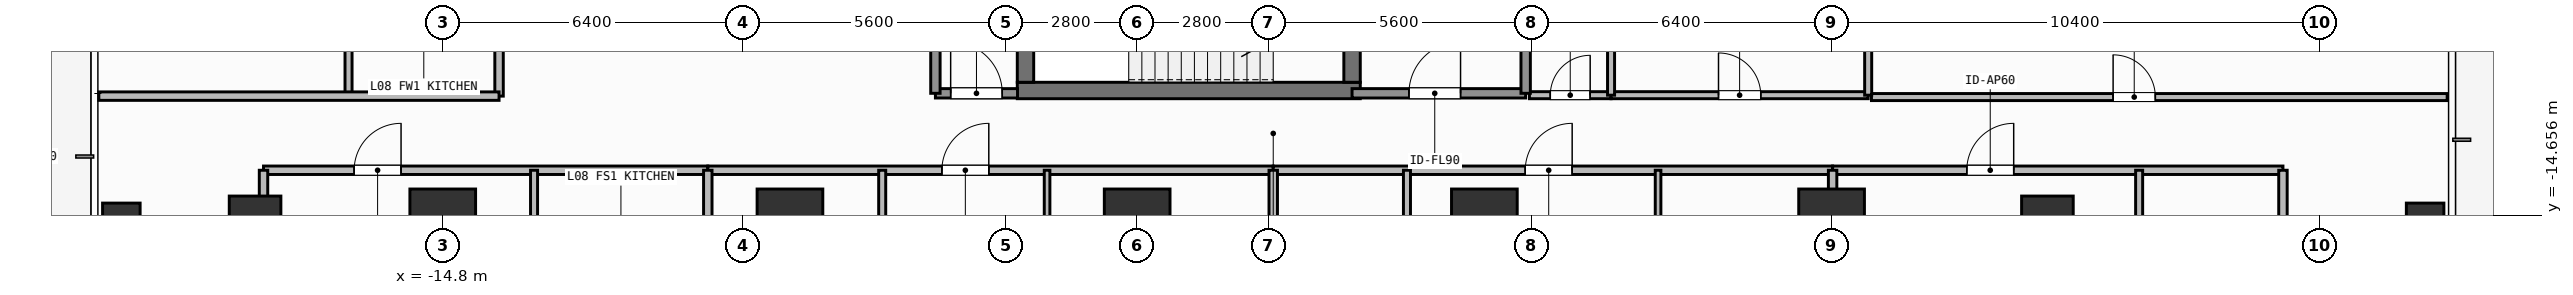
"""IFC4 building model, lengths in metres.
Left out: names, types, materials, properties, quantities, classifications, styles, units other than length and angle.
Written with IfcOpenShell. Run it as: python <this file> out.ifc"""

import sys

from ifc_helpers import new_model, si_unit, direction, frame, frame_2d, origin, origin_2d, place, context, subcontext, project, spatial, rectangle, hollow_rectangle, extrude, element, fill, save


model = new_model("IFC4")
c1 = context("Model", 3, precision=1e-05, world=origin(), true_north=direction((0.0, 1.0)))
c2 = subcontext(c1, "Body", "Model", "MODEL_VIEW")
j1 = project(units=[si_unit("LENGTHUNIT", "METRE"), si_unit("PLANEANGLEUNIT", "RADIAN")], contexts=[c1])
p1 = place(None, origin())
s1 = spatial("IfcSite", under=j1, at=p1, CompositionType="ELEMENT")
p2 = place(p1, origin())
s2 = spatial("IfcBuilding", under=s1, at=p2, CompositionType="ELEMENT")
p3 = place(p2, frame((0.0, 0.0, 30.6)))
s3 = spatial("IfcBuildingStorey", under=s2, at=p3, CompositionType="ELEMENT", Elevation=30.6)
p4 = place(p3, frame((-2.555, -12.0, 0.0), z_axis=(0.0, 0.0, 1.0), x_axis=(1.0, 0.0, 0.0)))
e1 = element("IfcWall", 1, at=p4, inside=s3, PredefinedType="SHEAR", context=c2, shape_type="SweptSolid", body=[
    extrude(rectangle(XDim=7.31, YDim=0.35, at=frame_2d((3.655, 0.0))), origin(), (0.0, 0.0, 1.0), 3.9),
])
p5 = place(p3, frame((-2.38, -11.825, 0.0), z_axis=(0.0, 0.0, 1.0), x_axis=(0.0, 1.0, 0.0)))
e2 = element("IfcWall", 2, at=p5, inside=s3, PredefinedType="SHEAR", context=c2, shape_type="SweptSolid", body=[
    extrude(rectangle(XDim=2.925, YDim=0.35, at=frame_2d((1.462, 0.0))), origin(), (0.0, 0.0, 1.0), 3.9),
])
p6 = place(p3, frame((4.58, -8.9, 0.0), z_axis=(0.0, 0.0, 1.0), x_axis=(0.0, -1.0, 0.0)))
e3 = element("IfcWall", 3, at=p6, inside=s3, PredefinedType="SHEAR", context=c2, shape_type="SweptSolid", body=[
    extrude(rectangle(XDim=2.925, YDim=0.35, at=frame_2d((1.462, 0.0))), origin(), (0.0, 0.0, 1.0), 3.9),
])
p7 = place(p6, frame((0.913, 0.0, 0.0)))
e4 = element("IfcOpeningElement", 4, at=p7, cuts=e3, PredefinedType="OPENING", context=c2, shape_type="SweptSolid", body=[
    extrude(rectangle(XDim=1.1, YDim=2.15, at=frame_2d((0.55, 1.075))), frame((0.0, 0.185, 0.0), z_axis=(0.0, -1.0, 0.0), x_axis=(1.0, 0.0, 0.0)), (0.0, 0.0, 1.0), 0.37),
])
for number, where, z_axis, x_axis in (
    (5, (-14.8, -14.8, 0.0), (0.0, 0.0, 1.0), (1.0, 0.0, 0.0)),
    (6, (-7.4, -14.8, 0.0), (0.0, 0.0, 1.0), (1.0, 0.0, 0.0)),
    (7, (0.0, -14.8, 0.0), (0.0, 0.0, 1.0), (1.0, 0.0, 0.0)),
    (8, (7.4, -14.8, 0.0), (0.0, 0.0, 1.0), (1.0, 0.0, 0.0)),
    (9, (14.8, -14.8, 0.0), (0.0, 0.0, 1.0), (1.0, 0.0, 0.0)),
):
    element("IfcColumn", number, at=place(p3, frame(where, z_axis=z_axis, x_axis=x_axis)), inside=s3, PredefinedType="COLUMN", context=c2, shape_type="SweptSolid", body=[
        extrude(rectangle(XDim=1.4, YDim=1.4, at=origin_2d()), origin(), (0.0, 0.0, 1.0), 3.9),
    ])
for number, where, z_axis, x_axis in (
    (10, (-18.8, -14.8, 0.0), (0.0, 0.0, 1.0), (1.0, 0.0, 0.0)),
    (11, (19.4, -14.8, 0.0), (0.0, 0.0, 1.0), (1.0, 0.0, 0.0)),
):
    element("IfcColumn", number, at=place(p3, frame(where, z_axis=z_axis, x_axis=x_axis)), inside=s3, PredefinedType="COLUMN", context=c2, shape_type="SweptSolid", body=[
        extrude(rectangle(XDim=1.1, YDim=1.1, at=origin_2d()), origin(), (0.0, 0.0, 1.0), 3.9),
    ])
for number, where, z_axis, x_axis in (
    (12, (-21.65, -14.8, 0.0), (0.0, 0.0, 1.0), (1.0, 0.0, 0.0)),
    (13, (27.45, -14.8, 0.0), (0.0, 0.0, 1.0), (1.0, 0.0, 0.0)),
):
    element("IfcColumn", number, at=place(p3, frame(where, z_axis=z_axis, x_axis=x_axis)), inside=s3, PredefinedType="COLUMN", context=c2, shape_type="SweptSolid", body=[
        extrude(hollow_rectangle(XDim=0.8, YDim=0.8, WallThickness=0.036, at=origin_2d()), origin(), (0.0, 0.0, 1.0), 3.9),
    ])
p8 = place(p3, frame((4.58, -12.06, 0.0), z_axis=(0.0, 0.0, 1.0), x_axis=(1.0, 0.0, 0.0)))
e14 = element("IfcWall", 14, at=p8, inside=s3, PredefinedType="SOLIDWALL", context=c2, shape_type="SweptSolid", body=[
    extrude(rectangle(XDim=3.7, YDim=0.2, at=frame_2d((1.85, 0.0))), origin(), (0.0, 0.0, 1.0), 3.68),
])
p9 = place(p8, frame((1.212, 0.0, 0.0)))
e15 = element("IfcOpeningElement", 15, at=p9, cuts=e14, PredefinedType="OPENING", context=c2, shape_type="SweptSolid", body=[
    extrude(rectangle(XDim=1.1, YDim=2.15, at=frame_2d((0.55, 1.075))), frame((0.0, 0.11, 0.0), z_axis=(0.0, -1.0, 0.0), x_axis=(1.0, 0.0, 0.0)), (0.0, 0.0, 1.0), 0.22),
])
p10 = place(p3, frame((-4.3, -12.06, 0.0), z_axis=(0.0, 0.0, 1.0), x_axis=(1.0, 0.0, 0.0)))
e16 = element("IfcWall", 16, at=p10, inside=s3, PredefinedType="SOLIDWALL", context=c2, shape_type="SweptSolid", body=[
    extrude(rectangle(XDim=1.75, YDim=0.2, at=frame_2d((0.875, 0.0))), origin(), (0.0, 0.0, 1.0), 3.68),
])
p11 = place(p10, frame((0.325, 0.0, 0.0)))
e17 = element("IfcOpeningElement", 17, at=p11, cuts=e16, PredefinedType="OPENING", context=c2, shape_type="SweptSolid", body=[
    extrude(rectangle(XDim=1.1, YDim=2.15, at=frame_2d((0.55, 1.075))), frame((0.0, 0.11, 0.0), z_axis=(0.0, -1.0, 0.0), x_axis=(1.0, 0.0, 0.0)), (0.0, 0.0, 1.0), 0.22),
])
p12 = place(p3, frame((8.36, -12.1, 0.0), z_axis=(0.0, 0.0, 1.0), x_axis=(1.0, 0.0, 0.0)))
e18 = element("IfcWall", 18, at=p12, inside=s3, PredefinedType="PARTITIONING", context=c2, shape_type="SweptSolid", body=[
    extrude(rectangle(XDim=1.74, YDim=0.15, at=frame_2d((0.87, 0.0))), origin(), (0.0, 0.0, 1.0), 3.68),
])
p13 = place(p12, frame((0.445, 0.0, 0.0)))
e19 = element("IfcOpeningElement", 19, at=p13, cuts=e18, PredefinedType="OPENING", context=c2, shape_type="SweptSolid", body=[
    extrude(rectangle(XDim=0.85, YDim=2.1, at=frame_2d((0.425, 1.05))), frame((0.0, 0.085, 0.0), z_axis=(0.0, -1.0, 0.0), x_axis=(1.0, 0.0, 0.0)), (0.0, 0.0, 1.0), 0.17),
])
p14 = place(p3, frame((10.1, -12.1, 0.0), z_axis=(0.0, 0.0, 1.0), x_axis=(1.0, 0.0, 0.0)))
e20 = element("IfcWall", 20, at=p14, inside=s3, PredefinedType="PARTITIONING", context=c2, shape_type="SweptSolid", body=[
    extrude(rectangle(XDim=5.48, YDim=0.15, at=frame_2d((2.74, 0.0))), origin(), (0.0, 0.0, 1.0), 3.68),
])
p15 = place(p14, frame((2.29, 0.0, 0.0)))
e21 = element("IfcOpeningElement", 21, at=p15, cuts=e20, PredefinedType="OPENING", context=c2, shape_type="SweptSolid", body=[
    extrude(rectangle(XDim=0.9, YDim=2.1, at=frame_2d((0.45, 1.05))), frame((0.0, 0.085, 0.0), z_axis=(0.0, -1.0, 0.0), x_axis=(1.0, 0.0, 0.0)), (0.0, 0.0, 1.0), 0.17),
])
p16 = place(p3, frame((-18.62, -13.7, 0.0), z_axis=(0.0, 0.0, 1.0), x_axis=(1.0, 0.0, 0.0)))
e22 = element("IfcWall", 22, at=p16, inside=s3, PredefinedType="PARTITIONING", context=c2, shape_type="SweptSolid", body=[
    extrude(rectangle(XDim=9.469, YDim=0.18, at=frame_2d((4.735, 0.0))), origin(), (0.0, 0.0, 1.0), 3.68),
])
p17 = place(p16, frame((1.931, 0.0, 0.0)))
e23 = element("IfcOpeningElement", 23, at=p17, cuts=e22, PredefinedType="OPENING", context=c2, shape_type="SweptSolid", body=[
    extrude(rectangle(XDim=1.0, YDim=2.2, at=frame_2d((0.5, 1.1))), frame((0.0, 0.1, 0.0), z_axis=(0.0, -1.0, 0.0), x_axis=(1.0, 0.0, 0.0)), (0.0, 0.0, 1.0), 0.2),
])
p18 = place(p3, frame((-12.854, -17.599, 0.0), z_axis=(0.0, 0.0, 1.0), x_axis=(0.0, 1.0, 0.0)))
e24 = element("IfcWall", 24, at=p18, inside=s3, PredefinedType="PARTITIONING", context=c2, shape_type="SweptSolid", body=[
    extrude(rectangle(XDim=3.899, YDim=0.15, at=frame_2d((1.95, 0.0))), origin(), (0.0, 0.0, 1.0), 3.68),
])
p19 = place(p18, frame((1.183, 0.0, 0.0)))
e25 = element("IfcOpeningElement", 25, at=p19, cuts=e24, PredefinedType="OPENING", context=c2, shape_type="SweptSolid", body=[
    extrude(rectangle(XDim=0.85, YDim=2.1, at=frame_2d((0.425, 1.05))), frame((0.0, 0.085, 0.0), z_axis=(0.0, -1.0, 0.0), x_axis=(1.0, 0.0, 0.0)), (0.0, 0.0, 1.0), 0.17),
])
p20 = place(p3, frame((-9.151, -13.7, 0.0), z_axis=(0.0, 0.0, 1.0), x_axis=(1.0, 0.0, 0.0)))
e26 = element("IfcWall", 26, at=p20, inside=s3, PredefinedType="PARTITIONING", context=c2, shape_type="SweptSolid", body=[
    extrude(rectangle(XDim=12.051, YDim=0.18, at=frame_2d((6.025, 0.0))), origin(), (0.0, 0.0, 1.0), 3.68),
])
p21 = place(p20, frame((4.989, 0.0, 0.0)))
e27 = element("IfcOpeningElement", 27, at=p21, cuts=e26, PredefinedType="OPENING", context=c2, shape_type="SweptSolid", body=[
    extrude(rectangle(XDim=1.0, YDim=2.2, at=frame_2d((0.5, 1.1))), frame((0.0, 0.1, 0.0), z_axis=(0.0, -1.0, 0.0), x_axis=(1.0, 0.0, 0.0)), (0.0, 0.0, 1.0), 0.2),
])
p22 = place(p3, frame((-5.434, -20.79, 0.0), z_axis=(0.0, 0.0, 1.0), x_axis=(0.0, 1.0, 0.0)))
e28 = element("IfcWall", 28, at=p22, inside=s3, PredefinedType="PARTITIONING", context=c2, shape_type="SweptSolid", body=[
    extrude(rectangle(XDim=7.09, YDim=0.15, at=frame_2d((3.545, 0.0))), origin(), (0.0, 0.0, 1.0), 3.68),
])
p23 = place(p22, frame((2.133, 0.0, 0.0)))
e29 = element("IfcOpeningElement", 29, at=p23, cuts=e28, PredefinedType="OPENING", context=c2, shape_type="SweptSolid", body=[
    extrude(rectangle(XDim=0.85, YDim=2.1, at=frame_2d((0.425, 1.05))), frame((0.0, 0.085, 0.0), z_axis=(0.0, -1.0, 0.0), x_axis=(1.0, 0.0, 0.0)), (0.0, 0.0, 1.0), 0.17),
])
p24 = place(p3, frame((-1.92, -18.663, 0.0), z_axis=(0.0, 0.0, 1.0), x_axis=(0.0, 1.0, 0.0)))
e30 = element("IfcWall", 30, at=p24, inside=s3, PredefinedType="PARTITIONING", context=c2, shape_type="SweptSolid", body=[
    extrude(rectangle(XDim=4.963, YDim=0.12, at=frame_2d((2.481, 0.0))), origin(), (0.0, 0.0, 1.0), 3.68),
])
p25 = place(p24, frame((2.056, 0.0, 0.0)))
e31 = element("IfcOpeningElement", 31, at=p25, cuts=e30, PredefinedType="OPENING", context=c2, shape_type="SweptSolid", body=[
    extrude(rectangle(XDim=0.85, YDim=2.1, at=frame_2d((0.425, 1.05))), frame((0.0, 0.07, 0.0), z_axis=(0.0, -1.0, 0.0), x_axis=(1.0, 0.0, 0.0)), (0.0, 0.0, 1.0), 0.14),
])
p26 = place(p3, frame((2.9, -13.7, 0.0), z_axis=(0.0, 0.0, 1.0), x_axis=(1.0, 0.0, 0.0)))
e32 = element("IfcWall", 32, at=p26, inside=s3, PredefinedType="PARTITIONING", context=c2, shape_type="SweptSolid", body=[
    extrude(rectangle(XDim=11.922, YDim=0.18, at=frame_2d((5.961, 0.0))), origin(), (0.0, 0.0, 1.0), 3.68),
])
p27 = place(p26, frame((5.371, 0.0, 0.0)))
e33 = element("IfcOpeningElement", 33, at=p27, cuts=e32, PredefinedType="OPENING", context=c2, shape_type="SweptSolid", body=[
    extrude(rectangle(XDim=1.0, YDim=2.2, at=frame_2d((0.5, 1.1))), frame((0.0, 0.1, 0.0), z_axis=(0.0, -1.0, 0.0), x_axis=(1.0, 0.0, 0.0)), (0.0, 0.0, 1.0), 0.2),
])
p28 = place(p3, frame((5.75, -20.79, 0.0), z_axis=(0.0, 0.0, 1.0), x_axis=(0.0, 1.0, 0.0)))
e34 = element("IfcWall", 34, at=p28, inside=s3, PredefinedType="PARTITIONING", context=c2, shape_type="SweptSolid", body=[
    extrude(rectangle(XDim=7.09, YDim=0.15, at=frame_2d((3.545, 0.0))), origin(), (0.0, 0.0, 1.0), 3.68),
])
p29 = place(p28, frame((2.133, 0.0, 0.0)))
e35 = element("IfcOpeningElement", 35, at=p29, cuts=e34, PredefinedType="OPENING", context=c2, shape_type="SweptSolid", body=[
    extrude(rectangle(XDim=0.85, YDim=2.1, at=frame_2d((0.425, 1.05))), frame((0.0, 0.085, 0.0), z_axis=(0.0, -1.0, 0.0), x_axis=(1.0, 0.0, 0.0)), (0.0, 0.0, 1.0), 0.17),
])
p30 = place(p3, frame((11.102, -18.535, 0.0), z_axis=(0.0, 0.0, 1.0), x_axis=(0.0, 1.0, 0.0)))
e36 = element("IfcWall", 36, at=p30, inside=s3, PredefinedType="PARTITIONING", context=c2, shape_type="SweptSolid", body=[
    extrude(rectangle(XDim=4.835, YDim=0.12, at=frame_2d((2.417, 0.0))), origin(), (0.0, 0.0, 1.0), 3.37),
])
p31 = place(p30, frame((1.905, 0.0, 0.0)))
e37 = element("IfcOpeningElement", 37, at=p31, cuts=e36, PredefinedType="OPENING", context=c2, shape_type="SweptSolid", body=[
    extrude(rectangle(XDim=0.85, YDim=2.1, at=frame_2d((0.425, 1.05))), frame((0.0, 0.07, 0.0), z_axis=(0.0, -1.0, 0.0), x_axis=(1.0, 0.0, 0.0)), (0.0, 0.0, 1.0), 0.14),
])
p32 = place(p3, frame((14.822, -13.7, 0.0), z_axis=(0.0, 0.0, 1.0), x_axis=(1.0, 0.0, 0.0)))
e38 = element("IfcWall", 38, at=p32, inside=s3, PredefinedType="PARTITIONING", context=c2, shape_type="SweptSolid", body=[
    extrude(rectangle(XDim=9.598, YDim=0.18, at=frame_2d((4.799, 0.0))), origin(), (0.0, 0.0, 1.0), 3.68),
])
p33 = place(p32, frame((2.859, 0.0, 0.0)))
e39 = element("IfcOpeningElement", 39, at=p33, cuts=e38, PredefinedType="OPENING", context=c2, shape_type="SweptSolid", body=[
    extrude(rectangle(XDim=1.0, YDim=2.2, at=frame_2d((0.5, 1.1))), frame((0.0, 0.1, 0.0), z_axis=(0.0, -1.0, 0.0), x_axis=(1.0, 0.0, 0.0)), (0.0, 0.0, 1.0), 0.2),
])
p34 = place(p3, frame((21.355, -17.599, 0.0), z_axis=(0.0, 0.0, 1.0), x_axis=(0.0, 1.0, 0.0)))
e40 = element("IfcWall", 40, at=p34, inside=s3, PredefinedType="PARTITIONING", context=c2, shape_type="SweptSolid", body=[
    extrude(rectangle(XDim=3.899, YDim=0.15, at=frame_2d((1.95, 0.0))), origin(), (0.0, 0.0, 1.0), 3.68),
])
p35 = place(p34, frame((1.354, 0.0, 0.0)))
e41 = element("IfcOpeningElement", 41, at=p35, cuts=e40, PredefinedType="OPENING", context=c2, shape_type="SweptSolid", body=[
    extrude(rectangle(XDim=0.85, YDim=2.1, at=frame_2d((0.425, 1.05))), frame((0.0, 0.085, 0.0), z_axis=(0.0, -1.0, 0.0), x_axis=(1.0, 0.0, 0.0)), (0.0, 0.0, 1.0), 0.17),
])
p36 = place(p3, frame((-13.6, -12.12, 0.0), z_axis=(0.0, 0.0, 1.0), x_axis=(0.0, 1.0, 0.0)))
e42 = element("IfcWall", 42, at=p36, inside=s3, PredefinedType="PARTITIONING", context=c2, shape_type="SweptSolid", body=[
    extrude(rectangle(XDim=12.847, YDim=0.18, at=frame_2d((6.424, 0.0))), origin(), (0.0, 0.0, 1.0), 3.68),
])
p37 = place(p36, frame((5.48, 0.0, 0.0)))
e43 = element("IfcOpeningElement", 43, at=p37, cuts=e42, PredefinedType="OPENING", context=c2, shape_type="SweptSolid", body=[
    extrude(rectangle(XDim=1.0, YDim=2.2, at=frame_2d((0.5, 1.1))), frame((0.0, 0.1, 0.0), z_axis=(0.0, -1.0, 0.0), x_axis=(1.0, 0.0, 0.0)), (0.0, 0.0, 1.0), 0.2),
])
p38 = place(p3, frame((15.65, -12.14, 0.0), z_axis=(0.0, 0.0, 1.0), x_axis=(1.0, 0.0, 0.0)))
e44 = element("IfcWall", 44, at=p38, inside=s3, PredefinedType="PARTITIONING", context=c2, shape_type="SweptSolid", body=[
    extrude(rectangle(XDim=12.27, YDim=0.15, at=frame_2d((6.135, 0.0))), origin(), (0.0, 0.0, 1.0), 3.68),
])
p39 = place(p38, frame((5.15, 0.0, 0.0)))
e45 = element("IfcOpeningElement", 45, at=p39, cuts=e44, PredefinedType="OPENING", context=c2, shape_type="SweptSolid", body=[
    extrude(rectangle(XDim=0.9, YDim=2.1, at=frame_2d((0.45, 1.05))), frame((0.0, 0.085, 0.0), z_axis=(0.0, -1.0, 0.0), x_axis=(1.0, 0.0, 0.0)), (0.0, 0.0, 1.0), 0.17),
])
for number, where, z_axis, x_axis in (
    (46, (8.28, -12.06, 0.0), (0.0, 0.0, 1.0), (0.0, 1.0, 0.0)),
    (47, (-4.3, -12.06, 0.0), (0.0, 0.0, 1.0), (0.0, 1.0, 0.0)),
):
    element("IfcWall", number, at=place(p3, frame(where, z_axis=z_axis, x_axis=x_axis)), inside=s3, PredefinedType="SOLIDWALL", context=c2, shape_type="SweptSolid", body=[
        extrude(rectangle(XDim=3.11, YDim=0.2, at=frame_2d((1.555, 0.0))), origin(), (0.0, 0.0, 1.0), 3.68),
    ])
p40 = place(p3, frame((10.1, -12.1, 0.0), z_axis=(0.0, 0.0, 1.0), x_axis=(0.0, 1.0, 0.0)))
e48 = element("IfcWall", 48, at=p40, inside=s3, PredefinedType="PARTITIONING", context=c2, shape_type="SweptSolid", body=[
    extrude(rectangle(XDim=2.35, YDim=0.15, at=frame_2d((1.175, 0.0))), origin(), (0.0, 0.0, 1.0), 3.68),
])
p41 = place(p3, frame((15.58, -12.1, 0.0), z_axis=(0.0, 0.0, 1.0), x_axis=(0.0, 1.0, 0.0)))
e49 = element("IfcWall", 49, at=p41, inside=s3, PredefinedType="PARTITIONING", context=c2, shape_type="SweptSolid", body=[
    extrude(rectangle(XDim=6.25, YDim=0.15, at=frame_2d((3.125, 0.0))), origin(), (0.0, 0.0, 1.0), 3.68),
])
p42 = place(p3, frame((-18.62, -23.91, 0.0), z_axis=(0.0, 0.0, 1.0), x_axis=(0.0, 1.0, 0.0)))
e50 = element("IfcWall", 50, at=p42, inside=s3, PredefinedType="PARTITIONING", context=c2, shape_type="SweptSolid", body=[
    extrude(rectangle(XDim=10.21, YDim=0.18, at=frame_2d((5.105, 0.0))), origin(), (0.0, 0.0, 1.0), 3.082),
])
p43 = place(p3, frame((24.42, -23.91, 0.0), z_axis=(0.0, 0.0, 1.0), x_axis=(0.0, 1.0, 0.0)))
e51 = element("IfcWall", 51, at=p43, inside=s3, PredefinedType="PARTITIONING", context=c2, shape_type="SweptSolid", body=[
    extrude(rectangle(XDim=10.21, YDim=0.18, at=frame_2d((5.105, 0.0))), origin(), (0.0, 0.0, 1.0), 3.68),
])
for number, where, z_axis, x_axis in (
    (52, (-9.151, -25.03, 0.0), (0.0, 0.0, 1.0), (0.0, 1.0, 0.0)),
    (53, (2.9, -25.03, 0.0), (0.0, 0.0, 1.0), (0.0, 1.0, 0.0)),
):
    element("IfcWall", number, at=place(p3, frame(where, z_axis=z_axis, x_axis=x_axis)), inside=s3, PredefinedType="PARTITIONING", context=c2, shape_type="SweptSolid", body=[
        extrude(rectangle(XDim=11.33, YDim=0.18, at=frame_2d((5.665, 0.0))), origin(), (0.0, 0.0, 1.0), 3.68),
    ])
p44 = place(p3, frame((14.822, -25.03, 0.0), z_axis=(0.0, 0.0, 1.0), x_axis=(0.0, 1.0, 0.0)))
e54 = element("IfcWall", 54, at=p44, inside=s3, PredefinedType="PARTITIONING", context=c2, shape_type="SweptSolid", body=[
    extrude(rectangle(XDim=11.33, YDim=0.18, at=frame_2d((5.665, 0.0))), origin(), (0.0, 0.0, 1.0), 3.082),
])
p45 = place(p3, frame((-16.808, -12.12, 0.0), z_axis=(0.0, 0.0, 1.0), x_axis=(0.0, 1.0, 0.0)))
e55 = element("IfcWall", 55, at=p45, inside=s3, PredefinedType="PARTITIONING", context=c2, shape_type="SweptSolid", body=[
    extrude(rectangle(XDim=2.8, YDim=0.15, at=frame_2d((1.4, 0.0))), origin(), (0.0, 0.0, 1.0), 3.68),
])
p46 = place(p3, frame((-22.13, -12.12, 0.0), z_axis=(0.0, 0.0, 1.0), x_axis=(1.0, 0.0, 0.0)))
e56 = element("IfcWall", 56, at=p46, inside=s3, PredefinedType="PARTITIONING", context=c2, shape_type="SweptSolid", body=[
    extrude(rectangle(XDim=8.53, YDim=0.18, at=frame_2d((4.265, 0.0))), origin(), (0.0, 0.0, 1.0), 3.68),
])
p47 = place(p9, origin())
e57 = element("IfcDoor", 57, at=p47, inside=s3, OperationType="SINGLE_SWING_RIGHT", PredefinedType="DOOR", context=c2, shape_type="SweptSolid", body=[
    extrude(rectangle(XDim=1.1, YDim=2.15, at=frame_2d((0.55, 1.075))), frame((0.0, 0.025, 0.0), z_axis=(0.0, -1.0, 0.0), x_axis=(1.0, 0.0, 0.0)), (0.0, 0.0, 1.0), 0.05),
])
fill(e15, e57)
p48 = place(p11, origin())
e58 = element("IfcDoor", 58, at=p48, inside=s3, OperationType="SINGLE_SWING_LEFT", PredefinedType="DOOR", context=c2, shape_type="SweptSolid", body=[
    extrude(rectangle(XDim=1.1, YDim=2.15, at=frame_2d((0.55, 1.075))), frame((0.0, 0.025, 0.0), z_axis=(0.0, -1.0, 0.0), x_axis=(1.0, 0.0, 0.0)), (0.0, 0.0, 1.0), 0.05),
])
fill(e17, e58)
p49 = place(p13, origin())
e59 = element("IfcDoor", 59, at=p49, inside=s3, OperationType="SINGLE_SWING_RIGHT", PredefinedType="DOOR", context=c2, shape_type="SweptSolid", body=[
    extrude(rectangle(XDim=0.85, YDim=2.1, at=frame_2d((0.425, 1.05))), frame((0.0, 0.025, 0.0), z_axis=(0.0, -1.0, 0.0), x_axis=(1.0, 0.0, 0.0)), (0.0, 0.0, 1.0), 0.05),
])
fill(e19, e59)
p50 = place(p15, origin())
e60 = element("IfcDoor", 60, at=p50, inside=s3, OperationType="SINGLE_SWING_LEFT", PredefinedType="DOOR", context=c2, shape_type="SweptSolid", body=[
    extrude(rectangle(XDim=0.9, YDim=2.1, at=frame_2d((0.45, 1.05))), frame((0.0, 0.025, 0.0), z_axis=(0.0, -1.0, 0.0), x_axis=(1.0, 0.0, 0.0)), (0.0, 0.0, 1.0), 0.05),
])
fill(e21, e60)
p51 = place(p17, origin())
e61 = element("IfcDoor", 61, at=p51, inside=s3, OperationType="SINGLE_SWING_RIGHT", PredefinedType="DOOR", context=c2, shape_type="SweptSolid", body=[
    extrude(rectangle(XDim=1.0, YDim=2.2, at=frame_2d((0.5, 1.1))), frame((0.0, 0.025, 0.0), z_axis=(0.0, -1.0, 0.0), x_axis=(1.0, 0.0, 0.0)), (0.0, 0.0, 1.0), 0.05),
])
fill(e23, e61)
p52 = place(p21, origin())
e62 = element("IfcDoor", 62, at=p52, inside=s3, OperationType="SINGLE_SWING_RIGHT", PredefinedType="DOOR", context=c2, shape_type="SweptSolid", body=[
    extrude(rectangle(XDim=1.0, YDim=2.2, at=frame_2d((0.5, 1.1))), frame((0.0, 0.025, 0.0), z_axis=(0.0, -1.0, 0.0), x_axis=(1.0, 0.0, 0.0)), (0.0, 0.0, 1.0), 0.05),
])
fill(e27, e62)
p53 = place(p27, origin())
e63 = element("IfcDoor", 63, at=p53, inside=s3, OperationType="SINGLE_SWING_RIGHT", PredefinedType="DOOR", context=c2, shape_type="SweptSolid", body=[
    extrude(rectangle(XDim=1.0, YDim=2.2, at=frame_2d((0.5, 1.1))), frame((0.0, 0.025, 0.0), z_axis=(0.0, -1.0, 0.0), x_axis=(1.0, 0.0, 0.0)), (0.0, 0.0, 1.0), 0.05),
])
fill(e33, e63)
p54 = place(p33, origin())
e64 = element("IfcDoor", 64, at=p54, inside=s3, OperationType="SINGLE_SWING_RIGHT", PredefinedType="DOOR", context=c2, shape_type="SweptSolid", body=[
    extrude(rectangle(XDim=1.0, YDim=2.2, at=frame_2d((0.5, 1.1))), frame((0.0, 0.025, 0.0), z_axis=(0.0, -1.0, 0.0), x_axis=(1.0, 0.0, 0.0)), (0.0, 0.0, 1.0), 0.05),
])
fill(e39, e64)
p55 = place(p39, origin())
e65 = element("IfcDoor", 65, at=p55, inside=s3, OperationType="SINGLE_SWING_LEFT", PredefinedType="DOOR", context=c2, shape_type="SweptSolid", body=[
    extrude(rectangle(XDim=0.9, YDim=2.1, at=frame_2d((0.45, 1.05))), frame((0.0, 0.025, 0.0), z_axis=(0.0, -1.0, 0.0), x_axis=(1.0, 0.0, 0.0)), (0.0, 0.0, 1.0), 0.05),
])
fill(e45, e65)
save(model, sys.argv[1])
